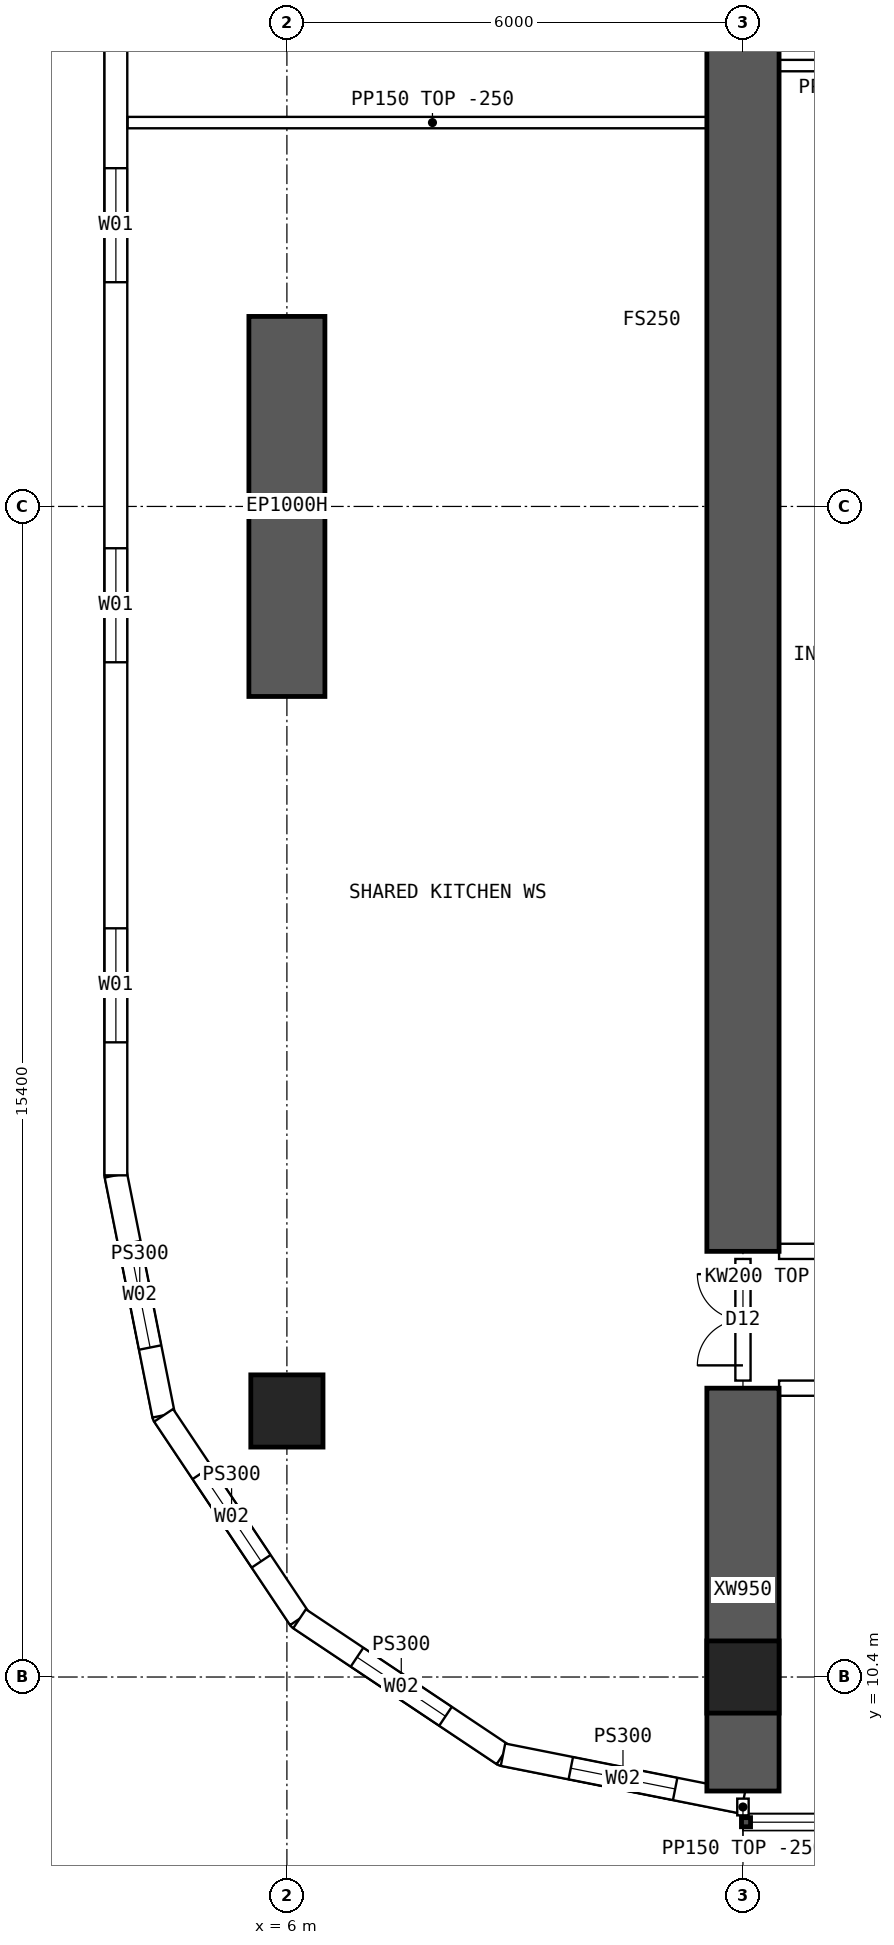
"""IFC4 building model, lengths in metres.
Left out: names, types, materials, properties, quantities, classifications, styles, units other than length and angle.
Written with IfcOpenShell. Run it as: python <this file> out.ifc"""

import sys

from ifc_helpers import new_model, si_unit, direction, frame, frame_2d, origin, origin_2d, place, context, subcontext, project, spatial, polyline, rectangle, hollow_rectangle, outline, extrude, element, fill, save


model = new_model("IFC4")
c1 = context("Model", 3, precision=1e-05, world=origin(), true_north=direction((0.0, 1.0)))
c2 = subcontext(c1, "Body", "Model", "MODEL_VIEW")
j1 = project(units=[si_unit("LENGTHUNIT", "METRE"), si_unit("PLANEANGLEUNIT", "RADIAN")], contexts=[c1])
p1 = place(None, origin())
s1 = spatial("IfcSite", under=j1, at=p1, CompositionType="ELEMENT")
p2 = place(p1, origin())
s2 = spatial("IfcBuilding", under=s1, at=p2, CompositionType="ELEMENT")
p3 = place(p2, frame((0.0, 0.0, 106.9)))
s3 = spatial("IfcBuildingStorey", under=s2, at=p3, CompositionType="ELEMENT", Elevation=106.9)
for number, where, z_axis, x_axis in (
    (1, (12.0, 10.4, 0.0), (0.0, 0.0, 1.0), (1.0, 0.0, 0.0)),
    (2, (6.0, 13.9, 0.0), (0.0, 0.0, 1.0), (1.0, 0.0, 0.0)),
):
    element("IfcColumn", number, at=place(p3, frame(where, z_axis=z_axis, x_axis=x_axis)), inside=s3, PredefinedType="COLUMN", context=c2, shape_type="SweptSolid", body=[
        extrude(hollow_rectangle(XDim=0.95, YDim=0.95, WallThickness=0.095, at=origin_2d()), origin(), (0.0, 0.0, 1.0), 3.75),
    ])
p4 = place(p3, frame((6.0, 23.3, 0.0), z_axis=(0.0, 0.0, 1.0), x_axis=(0.0, 1.0, 0.0)))
e3 = element("IfcWall", 3, at=p4, inside=s3, PredefinedType="SHEAR", context=c2, shape_type="SweptSolid", body=[
    extrude(rectangle(XDim=5.0, YDim=1.0, at=frame_2d((2.5, 0.0))), origin(), (0.0, 0.0, 1.0), 3.75),
])
p5 = place(p3, frame((12.0, 8.9, 0.0), z_axis=(0.0, 0.0, 1.0), x_axis=(0.0, 1.0, 0.0)))
e4 = element("IfcWall", 4, at=p5, inside=s3, PredefinedType="SHEAR", context=c2, shape_type="SweptSolid", body=[
    extrude(rectangle(XDim=5.3, YDim=0.95, at=frame_2d((2.65, 0.0))), origin(), (0.0, 0.0, 1.0), 3.75),
])
p6 = place(p3, frame((12.0, 16.0, 0.0), z_axis=(0.0, 0.0, 1.0), x_axis=(0.0, 1.0, 0.0)))
e5 = element("IfcWall", 5, at=p6, inside=s3, PredefinedType="SHEAR", context=c2, shape_type="SweptSolid", body=[
    extrude(rectangle(XDim=32.0, YDim=0.95, at=frame_2d((16.0, 0.0))), origin(), (0.0, 0.0, 1.0), 3.75),
])
p7 = place(p3, frame((3.75, 47.0, 0.0), z_axis=(0.0, 0.0, 1.0), x_axis=(0.0, -1.0, 0.0)))
e6 = element("IfcWall", 6, at=p7, inside=s3, PredefinedType="SOLIDWALL", context=c2, shape_type="SweptSolid", body=[
    extrude(outline(polyline([(-0.015, -0.15), (30.015, -0.15), (29.985, 0.15), (0.015, 0.15), (-0.015, -0.15)])), origin(), (0.0, 0.0, 1.0), 3.5),
])
p8 = place(p7, frame((1.75, 0.0, 0.9)))
e7 = element("IfcOpeningElement", 7, at=p8, cuts=e6, PredefinedType="OPENING", context=c2, shape_type="SweptSolid", body=[
    extrude(rectangle(XDim=1.5, YDim=2.0, at=frame_2d((0.75, 1.0))), frame((0.0, 0.16, 0.0), z_axis=(0.0, -1.0, 0.0), x_axis=(1.0, 0.0, 0.0)), (0.0, 0.0, 1.0), 0.32),
])
p9 = place(p7, frame((6.75, 0.0, 0.9)))
e8 = element("IfcOpeningElement", 8, at=p9, cuts=e6, PredefinedType="OPENING", context=c2, shape_type="SweptSolid", body=[
    extrude(rectangle(XDim=1.5, YDim=2.0, at=frame_2d((0.75, 1.0))), frame((0.0, 0.16, 0.0), z_axis=(0.0, -1.0, 0.0), x_axis=(1.0, 0.0, 0.0)), (0.0, 0.0, 1.0), 0.32),
])
p10 = place(p7, frame((11.75, 0.0, 0.9)))
e9 = element("IfcOpeningElement", 9, at=p10, cuts=e6, PredefinedType="OPENING", context=c2, shape_type="SweptSolid", body=[
    extrude(rectangle(XDim=1.5, YDim=2.0, at=frame_2d((0.75, 1.0))), frame((0.0, 0.16, 0.0), z_axis=(0.0, -1.0, 0.0), x_axis=(1.0, 0.0, 0.0)), (0.0, 0.0, 1.0), 0.32),
])
p11 = place(p7, frame((16.75, 0.0, 0.9)))
e10 = element("IfcOpeningElement", 10, at=p11, cuts=e6, PredefinedType="OPENING", context=c2, shape_type="SweptSolid", body=[
    extrude(rectangle(XDim=1.5, YDim=2.0, at=frame_2d((0.75, 1.0))), frame((0.0, 0.16, 0.0), z_axis=(0.0, -1.0, 0.0), x_axis=(1.0, 0.0, 0.0)), (0.0, 0.0, 1.0), 0.32),
])
p12 = place(p7, frame((21.75, 0.0, 0.9)))
e11 = element("IfcOpeningElement", 11, at=p12, cuts=e6, PredefinedType="OPENING", context=c2, shape_type="SweptSolid", body=[
    extrude(rectangle(XDim=1.5, YDim=2.0, at=frame_2d((0.75, 1.0))), frame((0.0, 0.16, 0.0), z_axis=(0.0, -1.0, 0.0), x_axis=(1.0, 0.0, 0.0)), (0.0, 0.0, 1.0), 0.32),
])
p13 = place(p7, frame((26.75, 0.0, 0.9)))
e12 = element("IfcOpeningElement", 12, at=p13, cuts=e6, PredefinedType="OPENING", context=c2, shape_type="SweptSolid", body=[
    extrude(rectangle(XDim=1.5, YDim=2.0, at=frame_2d((0.75, 1.0))), frame((0.0, 0.16, 0.0), z_axis=(0.0, -1.0, 0.0), x_axis=(1.0, 0.0, 0.0)), (0.0, 0.0, 1.0), 0.32),
])
p14 = place(p3, frame((3.75, 17.0, 0.0), z_axis=(0.0, 0.0, 1.0), x_axis=(0.195080412259, -0.980787251524, 0.0)))
e13 = element("IfcWall", 13, at=p14, inside=s3, PredefinedType="SOLIDWALL", context=c2, shape_type="SweptSolid", body=[
    extrude(outline(polyline([(-0.015, -0.15), (3.249, -0.15), (3.189, 0.15), (0.015, 0.15), (-0.015, -0.15)])), origin(), (0.0, 0.0, 1.0), 3.5),
])
p15 = place(p14, frame((0.909, 0.0, 0.9)))
e14 = element("IfcOpeningElement", 14, at=p15, cuts=e13, PredefinedType="OPENING", context=c2, shape_type="SweptSolid", body=[
    extrude(rectangle(XDim=1.4, YDim=1.8, at=frame_2d((0.7, 0.9))), frame((0.0, 0.16, 0.0), z_axis=(0.0, -1.0, 0.0), x_axis=(1.0, 0.0, 0.0)), (0.0, 0.0, 1.0), 0.32),
])
p16 = place(p3, frame((4.378, 13.843, 0.0), z_axis=(0.0, 0.0, 1.0), x_axis=(0.555609954424, -0.831443069936, 0.0)))
e15 = element("IfcWall", 15, at=p16, inside=s3, PredefinedType="SOLIDWALL", context=c2, shape_type="SweptSolid", body=[
    extrude(outline(polyline([(-0.03, -0.15), (3.249, -0.15), (3.189, 0.15), (0.03, 0.15), (-0.03, -0.15)])), origin(), (0.0, 0.0, 1.0), 3.5),
])
p17 = place(p16, frame((0.909, 0.0, 0.9)))
e16 = element("IfcOpeningElement", 16, at=p17, cuts=e15, PredefinedType="OPENING", context=c2, shape_type="SweptSolid", body=[
    extrude(rectangle(XDim=1.4, YDim=1.8, at=frame_2d((0.7, 0.9))), frame((0.0, 0.16, 0.0), z_axis=(0.0, -1.0, 0.0), x_axis=(1.0, 0.0, 0.0)), (0.0, 0.0, 1.0), 0.32),
])
p18 = place(p3, frame((6.167, 11.167, 0.0), z_axis=(0.0, 0.0, 1.0), x_axis=(0.831443069936, -0.555609954424, 0.0)))
e17 = element("IfcWall", 17, at=p18, inside=s3, PredefinedType="SOLIDWALL", context=c2, shape_type="SweptSolid", body=[
    extrude(outline(polyline([(-0.03, -0.15), (3.249, -0.15), (3.189, 0.15), (0.03, 0.15), (-0.03, -0.15)])), origin(), (0.0, 0.0, 1.0), 3.5),
])
p19 = place(p18, frame((0.909, 0.0, 0.9)))
e18 = element("IfcOpeningElement", 18, at=p19, cuts=e17, PredefinedType="OPENING", context=c2, shape_type="SweptSolid", body=[
    extrude(rectangle(XDim=1.4, YDim=1.8, at=frame_2d((0.7, 0.9))), frame((0.0, 0.16, 0.0), z_axis=(0.0, -1.0, 0.0), x_axis=(1.0, 0.0, 0.0)), (0.0, 0.0, 1.0), 0.32),
])
p20 = place(p3, frame((8.843, 9.378, 0.0), z_axis=(0.0, 0.0, 1.0), x_axis=(0.980787251524, -0.195080412259, 0.0)))
e19 = element("IfcWall", 19, at=p20, inside=s3, PredefinedType="SOLIDWALL", context=c2, shape_type="SweptSolid", body=[
    extrude(outline(polyline([(-0.03, -0.15), (3.249, -0.15), (3.189, 0.15), (0.03, 0.15), (-0.03, -0.15)])), origin(), (0.0, 0.0, 1.0), 3.5),
])
p21 = place(p20, frame((0.909, 0.0, 0.9)))
e20 = element("IfcOpeningElement", 20, at=p21, cuts=e19, PredefinedType="OPENING", context=c2, shape_type="SweptSolid", body=[
    extrude(rectangle(XDim=1.4, YDim=1.8, at=frame_2d((0.7, 0.9))), frame((0.0, 0.16, 0.0), z_axis=(0.0, -1.0, 0.0), x_axis=(1.0, 0.0, 0.0)), (0.0, 0.0, 1.0), 0.32),
])
p22 = place(p3, frame((12.475, 14.2, 0.0), z_axis=(0.0, 0.0, 1.0), x_axis=(1.0, 0.0, 0.0)))
e21 = element("IfcWall", 21, at=p22, inside=s3, PredefinedType="SOLIDWALL", context=c2, shape_type="SweptSolid", body=[
    extrude(outline(polyline([(0.0, 0.0), (5.05, 0.0), (5.05, 3.1), (0.0, 3.1), (0.0, 0.0)])), frame((0.0, 0.1, 0.0), z_axis=(0.0, -1.0, 0.0), x_axis=(1.0, 0.0, 0.0)), (0.0, 0.0, 1.0), 0.2),
])
p23 = place(p22, frame((0.6, 0.0, 0.0)))
e22 = element("IfcOpeningElement", 22, at=p23, cuts=e21, PredefinedType="OPENING", context=c2, shape_type="SweptSolid", body=[
    extrude(rectangle(XDim=1.0, YDim=2.1, at=frame_2d((0.5, 1.05))), frame((0.0, 0.11, 0.0), z_axis=(0.0, -1.0, 0.0), x_axis=(1.0, 0.0, 0.0)), (0.0, 0.0, 1.0), 0.22),
])
p24 = place(p3, frame((12.475, 16.0, 0.0), z_axis=(0.0, 0.0, 1.0), x_axis=(1.0, 0.0, 0.0)))
e23 = element("IfcWall", 23, at=p24, inside=s3, PredefinedType="SOLIDWALL", context=c2, shape_type="SweptSolid", body=[
    extrude(rectangle(XDim=5.05, YDim=0.2, at=frame_2d((2.525, 0.0))), origin(), (0.0, 0.0, 1.0), 3.5),
])
p25 = place(p24, frame((3.325, 0.0, 0.0)))
e24 = element("IfcOpeningElement", 24, at=p25, cuts=e23, PredefinedType="OPENING", context=c2, shape_type="SweptSolid", body=[
    extrude(rectangle(XDim=1.6, YDim=2.1, at=frame_2d((0.8, 1.05))), frame((0.0, 0.11, 0.0), z_axis=(0.0, -1.0, 0.0), x_axis=(1.0, 0.0, 0.0)), (0.0, 0.0, 1.0), 0.22),
])
p26 = place(p3, frame((12.0, 31.6, 0.0), z_axis=(0.0, 0.0, 1.0), x_axis=(1.0, 0.0, 0.0)))
e25 = element("IfcWall", 25, at=p26, inside=s3, PredefinedType="PARTITIONING", context=c2, shape_type="SweptSolid", body=[
    extrude(rectangle(XDim=3.6, YDim=0.15, at=frame_2d((1.8, 0.0))), origin(), (0.0, 0.0, 1.0), 3.5),
])
p27 = place(p3, frame((3.905, 30.85, 0.0), z_axis=(0.0, 0.0, 1.0), x_axis=(1.0, 0.0, 0.0)))
e26 = element("IfcWall", 26, at=p27, inside=s3, PredefinedType="PARTITIONING", context=c2, shape_type="SweptSolid", body=[
    extrude(outline(polyline([(0.0, 0.0), (8.02, 0.0), (8.02, 3.5), (2.397, 3.5), (2.395, 3.05), (1.797, 3.05), (1.795, 3.5), (0.0, 3.5), (0.0, 0.0)])), frame((0.0, 0.075, 0.0), z_axis=(0.0, -1.0, 0.0), x_axis=(1.0, 0.0, 0.0)), (0.0, 0.0, 1.0), 0.15),
])
p28 = place(p3, frame((12.0, 14.3, 0.0), z_axis=(0.0, 0.0, 1.0), x_axis=(0.0, 1.0, 0.0)))
e27 = element("IfcWall", 27, at=p28, inside=s3, PredefinedType="SOLIDWALL", context=c2, shape_type="SweptSolid", body=[
    extrude(outline(polyline([(0.0, 0.0), (1.6, 0.0), (1.6, 3.1), (0.0, 3.1), (0.0, 0.0)])), frame((0.0, 0.1, 0.0), z_axis=(0.0, -1.0, 0.0), x_axis=(1.0, 0.0, 0.0)), (0.0, 0.0, 1.0), 0.2),
])
p29 = place(p28, frame((0.2, 0.0, 0.0)))
e28 = element("IfcOpeningElement", 28, at=p29, cuts=e27, PredefinedType="OPENING", context=c2, shape_type="SweptSolid", body=[
    extrude(rectangle(XDim=1.2, YDim=2.1, at=frame_2d((0.6, 1.05))), frame((0.0, 0.11, 0.0), z_axis=(0.0, -1.0, 0.0), x_axis=(1.0, 0.0, 0.0)), (0.0, 0.0, 1.0), 0.22),
])
p30 = place(p3, frame((12.0, 8.8, 0.0), z_axis=(0.0, 0.0, 1.0), x_axis=(0.0, -1.0, 0.0)))
e29 = element("IfcWall", 29, at=p30, inside=s3, PredefinedType="PARTITIONING", context=c2, shape_type="SweptSolid", body=[
    extrude(rectangle(XDim=0.22, YDim=0.15, at=frame_2d((0.11, 0.0))), origin(), (0.0, 0.0, 1.0), 3.5),
])
p31 = place(p11, origin())
e30 = element("IfcWindow", 30, at=p31, inside=s3, PartitioningType="SINGLE_PANEL", PredefinedType="WINDOW", context=c2, shape_type="SweptSolid", body=[
    extrude(rectangle(XDim=1.5, YDim=2.0, at=frame_2d((0.75, 1.0))), frame((0.0, 0.03, 0.0), z_axis=(0.0, -1.0, 0.0), x_axis=(1.0, 0.0, 0.0)), (0.0, 0.0, 1.0), 0.06),
])
fill(e10, e30)
p32 = place(p12, origin())
e31 = element("IfcWindow", 31, at=p32, inside=s3, PartitioningType="SINGLE_PANEL", PredefinedType="WINDOW", context=c2, shape_type="SweptSolid", body=[
    extrude(rectangle(XDim=1.5, YDim=2.0, at=frame_2d((0.75, 1.0))), frame((0.0, 0.03, 0.0), z_axis=(0.0, -1.0, 0.0), x_axis=(1.0, 0.0, 0.0)), (0.0, 0.0, 1.0), 0.06),
])
fill(e11, e31)
p33 = place(p13, origin())
e32 = element("IfcWindow", 32, at=p33, inside=s3, PartitioningType="SINGLE_PANEL", PredefinedType="WINDOW", context=c2, shape_type="SweptSolid", body=[
    extrude(rectangle(XDim=1.5, YDim=2.0, at=frame_2d((0.75, 1.0))), frame((0.0, 0.03, 0.0), z_axis=(0.0, -1.0, 0.0), x_axis=(1.0, 0.0, 0.0)), (0.0, 0.0, 1.0), 0.06),
])
fill(e12, e32)
p34 = place(p15, origin())
e33 = element("IfcWindow", 33, at=p34, inside=s3, PartitioningType="SINGLE_PANEL", PredefinedType="WINDOW", context=c2, shape_type="SweptSolid", body=[
    extrude(rectangle(XDim=1.4, YDim=1.8, at=frame_2d((0.7, 0.9))), frame((0.0, 0.03, 0.0), z_axis=(0.0, -1.0, 0.0), x_axis=(1.0, 0.0, 0.0)), (0.0, 0.0, 1.0), 0.06),
])
fill(e14, e33)
p35 = place(p17, origin())
e34 = element("IfcWindow", 34, at=p35, inside=s3, PartitioningType="SINGLE_PANEL", PredefinedType="WINDOW", context=c2, shape_type="SweptSolid", body=[
    extrude(rectangle(XDim=1.4, YDim=1.8, at=frame_2d((0.7, 0.9))), frame((0.0, 0.03, 0.0), z_axis=(0.0, -1.0, 0.0), x_axis=(1.0, 0.0, 0.0)), (0.0, 0.0, 1.0), 0.06),
])
fill(e16, e34)
p36 = place(p19, origin())
e35 = element("IfcWindow", 35, at=p36, inside=s3, PartitioningType="SINGLE_PANEL", PredefinedType="WINDOW", context=c2, shape_type="SweptSolid", body=[
    extrude(rectangle(XDim=1.4, YDim=1.8, at=frame_2d((0.7, 0.9))), frame((0.0, 0.03, 0.0), z_axis=(0.0, -1.0, 0.0), x_axis=(1.0, 0.0, 0.0)), (0.0, 0.0, 1.0), 0.06),
])
fill(e18, e35)
p37 = place(p21, origin())
e36 = element("IfcWindow", 36, at=p37, inside=s3, PartitioningType="SINGLE_PANEL", PredefinedType="WINDOW", context=c2, shape_type="SweptSolid", body=[
    extrude(rectangle(XDim=1.4, YDim=1.8, at=frame_2d((0.7, 0.9))), frame((0.0, 0.03, 0.0), z_axis=(0.0, -1.0, 0.0), x_axis=(1.0, 0.0, 0.0)), (0.0, 0.0, 1.0), 0.06),
])
fill(e20, e36)
p38 = place(p29, origin())
e37 = element("IfcDoor", 37, at=p38, inside=s3, OperationType="DOUBLE_DOOR_SINGLE_SWING", PredefinedType="DOOR", context=c2, shape_type="SweptSolid", body=[
    extrude(rectangle(XDim=1.2, YDim=2.1, at=frame_2d((0.6, 1.05))), frame((0.0, 0.025, 0.0), z_axis=(0.0, -1.0, 0.0), x_axis=(1.0, 0.0, 0.0)), (0.0, 0.0, 1.0), 0.05),
])
fill(e28, e37)
save(model, sys.argv[1])
